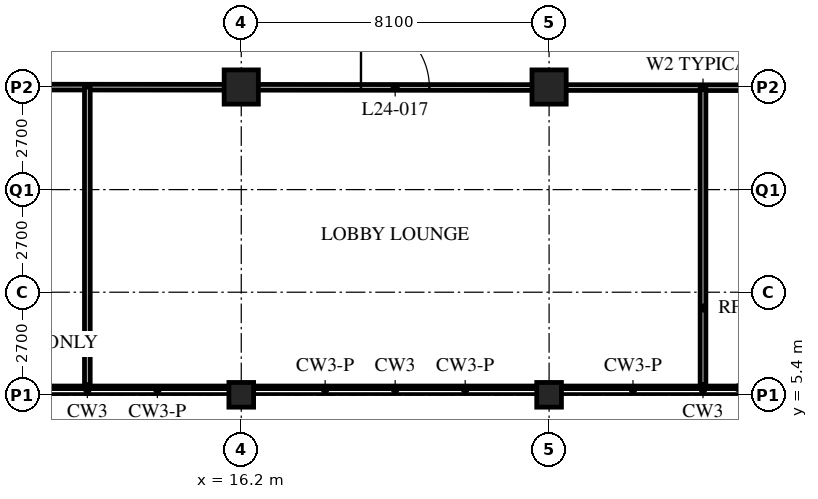
"""IFC4 building model, lengths in metres.
Left out: names, types, materials, properties, quantities, classifications, styles, units other than length and angle.
Written with IfcOpenShell. Run it as: python <this file> out.ifc"""

import sys

from ifc_helpers import new_model, si_unit, direction, frame, frame_2d, origin, origin_2d, place, context, subcontext, project, spatial, rectangle, hollow_rectangle, extrude, element, fill, save


model = new_model("IFC4")
c1 = context("Model", 3, precision=1e-05, world=origin(), true_north=direction((0.0, 1.0)))
c2 = subcontext(c1, "Body", "Model", "MODEL_VIEW")
j1 = project(units=[si_unit("LENGTHUNIT", "METRE"), si_unit("PLANEANGLEUNIT", "RADIAN")], contexts=[c1])
p1 = place(None, origin())
s1 = spatial("IfcSite", under=j1, at=p1, CompositionType="ELEMENT")
p2 = place(p1, origin())
s2 = spatial("IfcBuilding", under=s1, at=p2, CompositionType="ELEMENT")
p3 = place(p2, frame((0.0, 0.0, 98.0)))
s3 = spatial("IfcBuildingStorey", under=s2, at=p3, CompositionType="ELEMENT", Elevation=98.0)
p4 = place(p3, frame((16.2, 5.4, 0.0), z_axis=(0.0, 0.0, 1.0), x_axis=(1.0, 0.0, 0.0)))
e1 = element("IfcColumn", 1, at=p4, inside=s3, PredefinedType="COLUMN", context=c2, shape_type="SweptSolid", body=[
    extrude(hollow_rectangle(XDim=0.65, YDim=0.65, WallThickness=0.05, at=origin_2d()), origin(), (0.0, 0.0, 1.0), 5.4),
])
p5 = place(p3, frame((16.2, 13.5, 0.0), z_axis=(0.0, 0.0, 1.0), x_axis=(1.0, 0.0, 0.0)))
e2 = element("IfcColumn", 2, at=p5, inside=s3, PredefinedType="COLUMN", context=c2, shape_type="SweptSolid", body=[
    extrude(hollow_rectangle(XDim=0.9, YDim=0.9, WallThickness=0.1, at=origin_2d()), origin(), (0.0, 0.0, 1.0), 5.4),
])
p6 = place(p3, frame((24.3, 5.4, 0.0), z_axis=(0.0, 0.0, 1.0), x_axis=(1.0, 0.0, 0.0)))
e3 = element("IfcColumn", 3, at=p6, inside=s3, PredefinedType="COLUMN", context=c2, shape_type="SweptSolid", body=[
    extrude(hollow_rectangle(XDim=0.65, YDim=0.65, WallThickness=0.05, at=origin_2d()), origin(), (0.0, 0.0, 1.0), 5.4),
])
p7 = place(p3, frame((24.3, 13.5, 0.0), z_axis=(0.0, 0.0, 1.0), x_axis=(1.0, 0.0, 0.0)))
e4 = element("IfcColumn", 4, at=p7, inside=s3, PredefinedType="COLUMN", context=c2, shape_type="SweptSolid", body=[
    extrude(hollow_rectangle(XDim=0.9, YDim=0.9, WallThickness=0.1, at=origin_2d()), origin(), (0.0, 0.0, 1.0), 5.4),
])
p8 = place(p3, frame((8.1, 13.5, 0.0), z_axis=(0.0, 0.0, 1.0), x_axis=(0.999999628455, -0.000862027072, 0.0)))
e5 = element("IfcWall", 5, at=p8, inside=s3, PredefinedType="PARTITIONING", context=c2, shape_type="SweptSolid", body=[
    extrude(rectangle(XDim=40.5, YDim=0.15, at=frame_2d((20.25, 0.0))), origin(), (0.0, 0.0, 1.0), 4.49),
])
p9 = place(p8, frame((11.25, 0.0, 0.0)))
e6 = element("IfcOpeningElement", 6, at=p9, cuts=e5, PredefinedType="OPENING", context=c2, shape_type="SweptSolid", body=[
    extrude(rectangle(XDim=1.8, YDim=2.4, at=frame_2d((0.9, 1.2))), frame((0.0, 0.085, 0.0), z_axis=(0.0, -1.0, 0.0), x_axis=(1.0, 0.0, 0.0)), (0.0, 0.0, 1.0), 0.17),
])
p10 = place(p8, frame((25.15, 0.0, 0.0)))
e7 = element("IfcOpeningElement", 7, at=p10, cuts=e5, PredefinedType="OPENING", context=c2, shape_type="SweptSolid", body=[
    extrude(rectangle(XDim=1.8, YDim=2.4, at=frame_2d((0.9, 1.2))), frame((0.0, 0.085, 0.0), z_axis=(0.0, -1.0, 0.0), x_axis=(1.0, 0.0, 0.0)), (0.0, 0.0, 1.0), 0.17),
])
p11 = place(p8, frame((29.875, 0.0, 0.0)))
e8 = element("IfcOpeningElement", 8, at=p11, cuts=e5, PredefinedType="OPENING", context=c2, shape_type="SweptSolid", body=[
    extrude(rectangle(XDim=1.0, YDim=2.1, at=frame_2d((0.5, 1.05))), frame((0.0, 0.085, 0.0), z_axis=(0.0, -1.0, 0.0), x_axis=(1.0, 0.0, 0.0)), (0.0, 0.0, 1.0), 0.17),
])
p12 = place(p8, frame((34.85, 0.0, 0.0)))
e9 = element("IfcOpeningElement", 9, at=p12, cuts=e5, PredefinedType="OPENING", context=c2, shape_type="SweptSolid", body=[
    extrude(rectangle(XDim=1.0, YDim=2.1, at=frame_2d((0.5, 1.05))), frame((0.0, 0.085, 0.0), z_axis=(0.0, -1.0, 0.0), x_axis=(1.0, 0.0, 0.0)), (0.0, 0.0, 1.0), 0.17),
])
p13 = place(p8, frame((1.525, 0.0, 0.0)))
e10 = element("IfcOpeningElement", 10, at=p13, cuts=e5, PredefinedType="OPENING", context=c2, shape_type="SweptSolid", body=[
    extrude(rectangle(XDim=1.0, YDim=2.1, at=frame_2d((0.5, 1.05))), frame((0.0, 0.085, 0.0), z_axis=(0.0, -1.0, 0.0), x_axis=(1.0, 0.0, 0.0)), (0.0, 0.0, 1.0), 0.17),
])
p14 = place(p8, frame((37.975, 0.0, 0.0)))
e11 = element("IfcOpeningElement", 11, at=p14, cuts=e5, PredefinedType="OPENING", context=c2, shape_type="SweptSolid", body=[
    extrude(rectangle(XDim=1.0, YDim=2.1, at=frame_2d((0.5, 1.05))), frame((0.0, 0.085, 0.0), z_axis=(0.0, -1.0, 0.0), x_axis=(1.0, 0.0, 0.0)), (0.0, 0.0, 1.0), 0.17),
])
for number, where, z_axis, x_axis in (
    (12, (28.35, 13.5, 0.0), (0.0, 0.0, 1.0), (0.0, -1.0, 0.0)),
    (13, (12.15, 13.5, 0.0), (0.0, 0.0, 1.0), (0.0, -1.0, 0.0)),
):
    element("IfcWall", number, at=place(p3, frame(where, z_axis=z_axis, x_axis=x_axis)), inside=s3, PredefinedType="PARTITIONING", context=c2, shape_type="SweptSolid", body=[
        extrude(rectangle(XDim=7.834, YDim=0.15, at=frame_2d((3.917, 0.0))), origin(), (0.0, 0.0, 1.0), 5.19),
    ])
p15 = place(p9, origin())
e14 = element("IfcDoor", 14, at=p15, inside=s3, OperationType="DOUBLE_DOOR_SINGLE_SWING", PredefinedType="DOOR", context=c2, shape_type="SweptSolid", body=[
    extrude(rectangle(XDim=1.8, YDim=2.4, at=frame_2d((0.9, 1.2))), frame((0.0, 0.025, 0.0), z_axis=(0.0, -1.0, 0.0), x_axis=(1.0, 0.0, 0.0)), (0.0, 0.0, 1.0), 0.05),
])
fill(e6, e14)
save(model, sys.argv[1])
